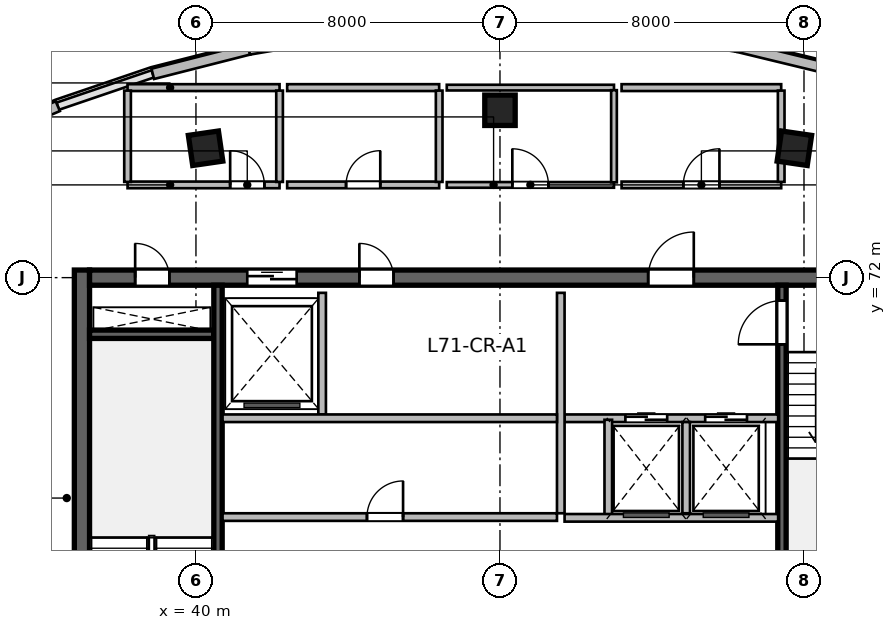
"""IFC4 building model, lengths in metres.
Left out: names, types, materials, properties, quantities, classifications, styles, units other than length and angle.
Written with IfcOpenShell. Run it as: python <this file> out.ifc"""

import sys

from ifc_helpers import new_model, si_unit, direction, frame, frame_2d, origin, origin_2d, place, context, subcontext, project, spatial, rectangle, extrude, source, transform, mapped, element, fill, save


model = new_model("IFC4")
c1 = context("Model", 3, precision=1e-05, world=origin(), true_north=direction((0.0, 1.0)))
c2 = subcontext(c1, "Body", "Model", "MODEL_VIEW")
j1 = project(units=[si_unit("LENGTHUNIT", "METRE"), si_unit("PLANEANGLEUNIT", "RADIAN")], contexts=[c1])
p1 = place(None, origin())
s1 = spatial("IfcSite", under=j1, at=p1, CompositionType="ELEMENT")
p2 = place(p1, origin())
s2 = spatial("IfcBuilding", under=s1, at=p2, CompositionType="ELEMENT")
p3 = place(p2, frame((0.0, 0.0, 291.3)))
s3 = spatial("IfcBuildingStorey", under=s2, at=p3, CompositionType="ELEMENT", Elevation=291.3)
m1 = source(origin(), c2, "Body", "SweptSolid", [
    extrude(rectangle(XDim=12.0, YDim=0.4, at=frame_2d((6.0, 0.0))), origin(), (0.0, 0.0, 1.0), 3.9),
])
p4 = place(p3, frame((37.0, 60.2, 0.0), z_axis=(0.0, 0.0, 1.0), x_axis=(0.0, 1.0, 0.0)))
e1 = element("IfcWall", 1, at=p4, inside=s3, PredefinedType="SHEAR", context=c2, shape_type="MappedRepresentation", body=[
    mapped(m1, transform((0.0, 0.0, 0.0), scale=1.0)),
])
m2 = source(origin(), c2, "Body", "SweptSolid", [
    extrude(rectangle(XDim=21.6, YDim=0.4, at=frame_2d((10.8, 0.0))), origin(), (0.0, 0.0, 1.0), 3.9),
])
p5 = place(p3, frame((37.2, 72.0, 0.0), z_axis=(0.0, 0.0, 1.0), x_axis=(1.0, 0.0, 0.0)))
e2 = element("IfcWall", 2, at=p5, inside=s3, PredefinedType="SHEAR", context=c2, shape_type="MappedRepresentation", body=[
    mapped(m2, transform((0.0, 0.0, 0.0), scale=1.0)),
])
p6 = place(p5, frame((1.2, 0.0, 0.0)))
e3 = element("IfcOpeningElement", 3, at=p6, cuts=e2, PredefinedType="OPENING", context=c2, shape_type="SweptSolid", body=[
    extrude(rectangle(XDim=0.9, YDim=2.1, at=frame_2d((0.45, 1.05))), frame((0.0, 0.21, 0.0), z_axis=(0.0, -1.0, 0.0), x_axis=(1.0, 0.0, 0.0)), (0.0, 0.0, 1.0), 0.42),
])
p7 = place(p5, frame((14.7, 0.0, 0.0)))
e4 = element("IfcOpeningElement", 4, at=p7, cuts=e2, PredefinedType="OPENING", context=c2, shape_type="SweptSolid", body=[
    extrude(rectangle(XDim=1.2, YDim=2.15, at=frame_2d((0.6, 1.075))), frame((0.0, 0.21, 0.0), z_axis=(0.0, -1.0, 0.0), x_axis=(1.0, 0.0, 0.0)), (0.0, 0.0, 1.0), 0.42),
])
p8 = place(p5, frame((4.15, 0.0, 0.0)))
e5 = element("IfcOpeningElement", 5, at=p8, cuts=e2, PredefinedType="OPENING", context=c2, shape_type="SweptSolid", body=[
    extrude(rectangle(XDim=1.3, YDim=2.15, at=frame_2d((0.65, 1.075))), frame((0.0, 0.21, 0.0), z_axis=(0.0, -1.0, 0.0), x_axis=(1.0, 0.0, 0.0)), (0.0, 0.0, 1.0), 0.42),
])
p9 = place(p5, frame((7.1, 0.0, 0.0)))
e6 = element("IfcOpeningElement", 6, at=p9, cuts=e2, PredefinedType="OPENING", context=c2, shape_type="SweptSolid", body=[
    extrude(rectangle(XDim=0.9, YDim=2.1, at=frame_2d((0.45, 1.05))), frame((0.0, 0.21, 0.0), z_axis=(0.0, -1.0, 0.0), x_axis=(1.0, 0.0, 0.0)), (0.0, 0.0, 1.0), 0.42),
])
m3 = source(origin(), c2, "Body", "SweptSolid", [
    extrude(rectangle(XDim=3.27, YDim=0.22, at=frame_2d((1.635, 0.0))), origin(), (0.0, 0.0, 1.0), 3.9),
])
p10 = place(p3, frame((37.2, 70.51, 0.0), z_axis=(0.0, 0.0, 1.0), x_axis=(1.0, 0.0, 0.0)))
e7 = element("IfcWall", 7, at=p10, inside=s3, PredefinedType="SHEAR", context=c2, shape_type="MappedRepresentation", body=[
    mapped(m3, transform((0.0, 0.0, 0.0), scale=1.0)),
])
m4 = source(origin(), c2, "Body", "SweptSolid", [
    extrude(rectangle(XDim=11.2, YDim=0.22, at=frame_2d((5.6, 0.0))), origin(), (0.0, 0.0, 1.0), 3.9),
])
p11 = place(p3, frame((40.58, 60.6, 0.0), z_axis=(0.0, 0.0, 1.0), x_axis=(0.0, 1.0, 0.0)))
e8 = element("IfcWall", 8, at=p11, inside=s3, PredefinedType="SHEAR", context=c2, shape_type="MappedRepresentation", body=[
    mapped(m4, transform((0.0, 0.0, 0.0), scale=1.0)),
])
p12 = place(p3, frame((55.42, 60.6, 0.0), z_axis=(0.0, 0.0, 1.0), x_axis=(0.0, 1.0, 0.0)))
e9 = element("IfcWall", 9, at=p12, inside=s3, PredefinedType="SHEAR", context=c2, shape_type="MappedRepresentation", body=[
    mapped(m4, transform((0.0, 0.0, 0.0), scale=1.0)),
])
p13 = place(p12, frame((9.645, 0.0, 0.0)))
e10 = element("IfcOpeningElement", 10, at=p13, cuts=e9, PredefinedType="OPENING", context=c2, shape_type="SweptSolid", body=[
    extrude(rectangle(XDim=1.15, YDim=2.15, at=frame_2d((0.575, 1.075))), frame((0.0, 0.12, 0.0), z_axis=(0.0, -1.0, 0.0), x_axis=(1.0, 0.0, 0.0)), (0.0, 0.0, 1.0), 0.24),
])
m5 = source(origin(), c2, "Body", "SweptSolid", [
    extrude(rectangle(XDim=0.8, YDim=0.8, at=origin_2d()), origin(), (0.0, 0.0, 1.0), 3.9),
])
for number, where, z_axis, x_axis in (
    (11, (40.253, 75.404, 0.0), (0.0, 0.0, 1.0), (-0.143, 0.99, 0.0)),
    (12, (48.0, 76.404, 0.0), (0.0, 0.0, 1.0), (0.0, 1.0, 0.0)),
    (13, (55.747, 75.404, 0.0), (0.0, 0.0, 1.0), (0.143, 0.99, 0.0)),
):
    element("IfcColumn", number, at=place(p3, frame(where, z_axis=z_axis, x_axis=x_axis)), inside=s3, PredefinedType="COLUMN", context=c2, shape_type="MappedRepresentation", body=[
        mapped(m5, transform((0.0, 0.0, 0.0), scale=1.0)),
    ])
m6 = source(origin(), c2, "Body", "SweptSolid", [
    extrude(rectangle(XDim=2.673, YDim=0.28, at=frame_2d((1.337, 0.0))), origin(), (0.0, 0.0, 1.0), 3.64),
])
p14 = place(p3, frame((33.907, 75.458, 0.0), z_axis=(0.0, 0.0, 1.0), x_axis=(0.919036345912, 0.394172798266, 0.0)))
e14 = element("IfcWall", 14, at=p14, inside=s3, PredefinedType="SOLIDWALL", context=c2, shape_type="MappedRepresentation", body=[
    mapped(m6, transform((0.0, 0.0, 0.0), scale=1.0)),
])
m7 = source(origin(), c2, "Body", "SweptSolid", [
    extrude(rectangle(XDim=2.614, YDim=0.28, at=frame_2d((1.307, 0.0))), origin(), (0.0, 0.0, 1.0), 3.64),
])
p15 = place(p3, frame((38.863, 77.362, 0.0), z_axis=(0.0, 0.0, 1.0), x_axis=(0.969106509315, 0.246642602978, 0.0)))
e15 = element("IfcWall", 15, at=p15, inside=s3, PredefinedType="SOLIDWALL", context=c2, shape_type="MappedRepresentation", body=[
    mapped(m7, transform((0.0, 0.0, 0.0), scale=1.0)),
])
m8 = source(origin(), c2, "Body", "SweptSolid", [
    extrude(rectangle(XDim=2.594, YDim=0.28, at=frame_2d((1.297, 0.0))), origin(), (0.0, 0.0, 1.0), 3.64),
])
p16 = place(p3, frame((41.397, 78.007, 0.0), z_axis=(0.0, 0.0, 1.0), x_axis=(0.985792341502, 0.167968626344, 0.0)))
e16 = element("IfcWall", 16, at=p16, inside=s3, PredefinedType="SOLIDWALL", context=c2, shape_type="MappedRepresentation", body=[
    mapped(m8, transform((0.0, 0.0, 0.0), scale=1.0)),
])
m9 = source(origin(), c2, "Body", "SweptSolid", [
    extrude(rectangle(XDim=2.611, YDim=0.28, at=frame_2d((1.305, 0.0))), origin(), (0.0, 0.0, 1.0), 3.64),
])
p17 = place(p3, frame((54.239, 78.082, 0.0), z_axis=(0.0, 0.0, 1.0), x_axis=(0.97188253817, -0.235466201396, 0.0)))
e17 = element("IfcWall", 17, at=p17, inside=s3, PredefinedType="SOLIDWALL", context=c2, shape_type="MappedRepresentation", body=[
    mapped(m9, transform((0.0, 0.0, 0.0), scale=1.0)),
])
m10 = source(origin(), c2, "Body", "SweptSolid", [
    extrude(rectangle(XDim=5.62, YDim=0.2, at=frame_2d((2.81, 0.0))), origin(), (0.0, 0.0, 1.0), 3.64),
])
p18 = place(p3, frame((49.7, 68.3, 0.0), z_axis=(0.0, 0.0, 1.0), x_axis=(1.0, 0.0, 0.0)))
e18 = element("IfcWall", 18, at=p18, inside=s3, PredefinedType="SOLIDWALL", context=c2, shape_type="MappedRepresentation", body=[
    mapped(m10, transform((0.0, 0.0, 0.0), scale=1.0)),
])
p19 = place(p18, frame((1.6, 0.0, 0.0)))
e19 = element("IfcOpeningElement", 19, at=p19, cuts=e18, PredefinedType="OPENING", context=c2, shape_type="SweptSolid", body=[
    extrude(rectangle(XDim=1.1, YDim=2.15, at=frame_2d((0.55, 1.075))), frame((0.0, 0.11, 0.0), z_axis=(0.0, -1.0, 0.0), x_axis=(1.0, 0.0, 0.0)), (0.0, 0.0, 1.0), 0.22),
])
p20 = place(p18, frame((3.7, 0.0, 0.0)))
e20 = element("IfcOpeningElement", 20, at=p20, cuts=e18, PredefinedType="OPENING", context=c2, shape_type="SweptSolid", body=[
    extrude(rectangle(XDim=1.1, YDim=2.15, at=frame_2d((0.55, 1.075))), frame((0.0, 0.11, 0.0), z_axis=(0.0, -1.0, 0.0), x_axis=(1.0, 0.0, 0.0)), (0.0, 0.0, 1.0), 0.22),
])
m11 = source(origin(), c2, "Body", "SweptSolid", [
    extrude(rectangle(XDim=5.8, YDim=0.2, at=frame_2d((2.9, 0.0))), origin(), (0.0, 0.0, 1.0), 3.64),
])
p21 = place(p3, frame((49.6, 65.8, 0.0), z_axis=(0.0, 0.0, 1.0), x_axis=(0.0, 1.0, 0.0)))
e21 = element("IfcWall", 21, at=p21, inside=s3, PredefinedType="SOLIDWALL", context=c2, shape_type="MappedRepresentation", body=[
    mapped(m11, transform((0.0, 0.0, 0.0), scale=1.0)),
])
m12 = source(origin(), c2, "Body", "SweptSolid", [
    extrude(rectangle(XDim=2.58, YDim=0.2, at=frame_2d((1.29, 0.0))), origin(), (0.0, 0.0, 1.0), 3.64),
])
p22 = place(p3, frame((50.85, 65.68, 0.0), z_axis=(0.0, 0.0, 1.0), x_axis=(0.0, 1.0, 0.0)))
e22 = element("IfcWall", 22, at=p22, inside=s3, PredefinedType="SOLIDWALL", context=c2, shape_type="MappedRepresentation", body=[
    mapped(m12, transform((0.0, 0.0, 0.0), scale=1.0)),
])
m13 = source(origin(), c2, "Body", "SweptSolid", [
    extrude(rectangle(XDim=2.4, YDim=0.2, at=frame_2d((1.2, 0.0))), origin(), (0.0, 0.0, 1.0), 3.64),
])
p23 = place(p3, frame((52.9, 65.8, 0.0), z_axis=(0.0, 0.0, 1.0), x_axis=(0.0, 1.0, 0.0)))
e23 = element("IfcWall", 23, at=p23, inside=s3, PredefinedType="SOLIDWALL", context=c2, shape_type="MappedRepresentation", body=[
    mapped(m13, transform((0.0, 0.0, 0.0), scale=1.0)),
])
p24 = place(p3, frame((49.7, 65.68, 0.0), z_axis=(0.0, 0.0, 1.0), x_axis=(1.0, 0.0, 0.0)))
e24 = element("IfcWall", 24, at=p24, inside=s3, PredefinedType="SOLIDWALL", context=c2, shape_type="MappedRepresentation", body=[
    mapped(m10, transform((0.0, 0.0, 0.0), scale=1.0)),
])
m14 = source(origin(), c2, "Body", "SweptSolid", [
    extrude(rectangle(XDim=3.2, YDim=0.2, at=frame_2d((1.6, 0.0))), origin(), (0.0, 0.0, 1.0), 3.64),
])
p25 = place(p3, frame((43.32, 68.4, 0.0), z_axis=(0.0, 0.0, 1.0), x_axis=(0.0, 1.0, 0.0)))
e25 = element("IfcWall", 25, at=p25, inside=s3, PredefinedType="SOLIDWALL", context=c2, shape_type="MappedRepresentation", body=[
    mapped(m14, transform((0.0, 0.0, 0.0), scale=1.0)),
])
m15 = source(origin(), c2, "Body", "SweptSolid", [
    extrude(rectangle(XDim=8.8, YDim=0.2, at=frame_2d((4.4, 0.0))), origin(), (0.0, 0.0, 1.0), 3.64),
])
p26 = place(p3, frame((40.7, 68.3, 0.0), z_axis=(0.0, 0.0, 1.0), x_axis=(1.0, 0.0, 0.0)))
e26 = element("IfcWall", 26, at=p26, inside=s3, PredefinedType="SOLIDWALL", context=c2, shape_type="MappedRepresentation", body=[
    mapped(m15, transform((0.0, 0.0, 0.0), scale=1.0)),
])
p27 = place(p3, frame((40.7, 65.7, 0.0), z_axis=(0.0, 0.0, 1.0), x_axis=(1.0, 0.0, 0.0)))
e27 = element("IfcWall", 27, at=p27, inside=s3, PredefinedType="SOLIDWALL", context=c2, shape_type="MappedRepresentation", body=[
    mapped(m15, transform((0.0, 0.0, 0.0), scale=1.0)),
])
p28 = place(p27, frame((3.8, 0.0, 0.0)))
e28 = element("IfcOpeningElement", 28, at=p28, cuts=e27, PredefinedType="OPENING", context=c2, shape_type="SweptSolid", body=[
    extrude(rectangle(XDim=0.95, YDim=2.15, at=frame_2d((0.475, 1.075))), frame((0.0, 0.11, 0.0), z_axis=(0.0, -1.0, 0.0), x_axis=(1.0, 0.0, 0.0)), (0.0, 0.0, 1.0), 0.22),
])
m16 = source(origin(), c2, "Body", "SweptSolid", [
    extrude(rectangle(XDim=4.0, YDim=0.175, at=frame_2d((2.0, 0.0))), origin(), (0.0, 0.0, 1.0), 3.64),
])
p29 = place(p3, frame((38.2, 74.44, 0.0), z_axis=(0.0, 0.0, 1.0), x_axis=(1.0, 0.0, 0.0)))
e29 = element("IfcWall", 29, at=p29, inside=s3, PredefinedType="PARTITIONING", context=c2, shape_type="MappedRepresentation", body=[
    mapped(m16, transform((0.0, 0.0, 0.0), scale=1.0)),
])
p30 = place(p29, frame((2.7, 0.0, 0.0)))
e30 = element("IfcOpeningElement", 30, at=p30, cuts=e29, PredefinedType="OPENING", context=c2, shape_type="SweptSolid", body=[
    extrude(rectangle(XDim=0.9, YDim=2.08, at=frame_2d((0.45, 1.04))), frame((0.0, 0.098, 0.0), z_axis=(0.0, -1.0, 0.0), x_axis=(1.0, 0.0, 0.0)), (0.0, 0.0, 1.0), 0.195),
])
m17 = source(origin(), c2, "Body", "SweptSolid", [
    extrude(rectangle(XDim=4.0, YDim=0.18, at=frame_2d((2.0, 0.0))), origin(), (0.0, 0.0, 1.0), 3.64),
])
p31 = place(p3, frame((38.2, 77.0, 0.0), z_axis=(0.0, 0.0, 1.0), x_axis=(1.0, 0.0, 0.0)))
e31 = element("IfcWall", 31, at=p31, inside=s3, PredefinedType="PLUMBINGWALL", context=c2, shape_type="MappedRepresentation", body=[
    mapped(m17, transform((0.0, 0.0, 0.0), scale=1.0)),
])
m18 = source(origin(), c2, "Body", "SweptSolid", [
    extrude(rectangle(XDim=2.403, YDim=0.175, at=frame_2d((1.201, 0.0))), origin(), (0.0, 0.0, 1.0), 3.64),
])
for number, where, z_axis, x_axis in (
    (32, (38.2, 74.519, 0.0), (0.0, 0.0, 1.0), (0.0, 1.0, 0.0)),
    (33, (42.2, 74.519, 0.0), (0.0, 0.0, 1.0), (0.0, 1.0, 0.0)),
):
    element("IfcWall", number, at=place(p3, frame(where, z_axis=z_axis, x_axis=x_axis)), inside=s3, PredefinedType="PARTITIONING", context=c2, shape_type="MappedRepresentation", body=[
        mapped(m18, transform((0.0, 0.0, 0.0), scale=1.0)),
    ])
p32 = place(p3, frame((42.4, 74.44, 0.0), z_axis=(0.0, 0.0, 1.0), x_axis=(1.0, 0.0, 0.0)))
e34 = element("IfcWall", 34, at=p32, inside=s3, PredefinedType="PARTITIONING", context=c2, shape_type="MappedRepresentation", body=[
    mapped(m16, transform((0.0, 0.0, 0.0), scale=1.0)),
])
p33 = place(p32, frame((1.55, 0.0, 0.0)))
e35 = element("IfcOpeningElement", 35, at=p33, cuts=e34, PredefinedType="OPENING", context=c2, shape_type="SweptSolid", body=[
    extrude(rectangle(XDim=0.9, YDim=2.08, at=frame_2d((0.45, 1.04))), frame((0.0, 0.098, 0.0), z_axis=(0.0, -1.0, 0.0), x_axis=(1.0, 0.0, 0.0)), (0.0, 0.0, 1.0), 0.195),
])
p34 = place(p3, frame((42.4, 77.0, 0.0), z_axis=(0.0, 0.0, 1.0), x_axis=(1.0, 0.0, 0.0)))
e36 = element("IfcWall", 36, at=p34, inside=s3, PredefinedType="PLUMBINGWALL", context=c2, shape_type="MappedRepresentation", body=[
    mapped(m17, transform((0.0, 0.0, 0.0), scale=1.0)),
])
p35 = place(p3, frame((46.4, 74.519, 0.0), z_axis=(0.0, 0.0, 1.0), x_axis=(0.0, 1.0, 0.0)))
e37 = element("IfcWall", 37, at=p35, inside=s3, PredefinedType="PARTITIONING", context=c2, shape_type="MappedRepresentation", body=[
    mapped(m18, transform((0.0, 0.0, 0.0), scale=1.0)),
])
m19 = source(origin(), c2, "Body", "SweptSolid", [
    extrude(rectangle(XDim=4.4, YDim=0.15, at=frame_2d((2.2, 0.0))), origin(), (0.0, 0.0, 1.0), 3.64),
])
p36 = place(p3, frame((46.6, 74.44, 0.0), z_axis=(0.0, 0.0, 1.0), x_axis=(1.0, 0.0, 0.0)))
e38 = element("IfcWall", 38, at=p36, inside=s3, PredefinedType="PARTITIONING", context=c2, shape_type="MappedRepresentation", body=[
    mapped(m19, transform((0.0, 0.0, 0.0), scale=1.0)),
])
p37 = place(p36, frame((1.725, 0.0, 0.0)))
e39 = element("IfcOpeningElement", 39, at=p37, cuts=e38, PredefinedType="OPENING", context=c2, shape_type="SweptSolid", body=[
    extrude(rectangle(XDim=0.95, YDim=2.1, at=frame_2d((0.475, 1.05))), frame((0.0, 0.085, 0.0), z_axis=(0.0, -1.0, 0.0), x_axis=(1.0, 0.0, 0.0)), (0.0, 0.0, 1.0), 0.17),
])
p38 = place(p3, frame((46.6, 77.0, 0.0), z_axis=(0.0, 0.0, 1.0), x_axis=(1.0, 0.0, 0.0)))
e40 = element("IfcWall", 40, at=p38, inside=s3, PredefinedType="PARTITIONING", context=c2, shape_type="MappedRepresentation", body=[
    mapped(m19, transform((0.0, 0.0, 0.0), scale=1.0)),
])
m20 = source(origin(), c2, "Body", "SweptSolid", [
    extrude(rectangle(XDim=2.425, YDim=0.15, at=frame_2d((1.212, 0.0))), origin(), (0.0, 0.0, 1.0), 3.64),
])
p39 = place(p3, frame((51.0, 74.508, 0.0), z_axis=(0.0, 0.0, 1.0), x_axis=(0.0, 1.0, 0.0)))
e41 = element("IfcWall", 41, at=p39, inside=s3, PredefinedType="PARTITIONING", context=c2, shape_type="MappedRepresentation", body=[
    mapped(m20, transform((0.0, 0.0, 0.0), scale=1.0)),
])
m21 = source(origin(), c2, "Body", "SweptSolid", [
    extrude(rectangle(XDim=4.2, YDim=0.175, at=frame_2d((2.1, 0.0))), origin(), (0.0, 0.0, 1.0), 3.64),
])
p40 = place(p3, frame((51.2, 74.44, 0.0), z_axis=(0.0, 0.0, 1.0), x_axis=(1.0, 0.0, 0.0)))
e42 = element("IfcWall", 42, at=p40, inside=s3, PredefinedType="PARTITIONING", context=c2, shape_type="MappedRepresentation", body=[
    mapped(m21, transform((0.0, 0.0, 0.0), scale=1.0)),
])
p41 = place(p40, frame((1.625, 0.0, 0.0)))
e43 = element("IfcOpeningElement", 43, at=p41, cuts=e42, PredefinedType="OPENING", context=c2, shape_type="SweptSolid", body=[
    extrude(rectangle(XDim=0.95, YDim=2.12, at=frame_2d((0.475, 1.06))), frame((0.0, 0.098, 0.0), z_axis=(0.0, -1.0, 0.0), x_axis=(1.0, 0.0, 0.0)), (0.0, 0.0, 1.0), 0.195),
])
m22 = source(origin(), c2, "Body", "SweptSolid", [
    extrude(rectangle(XDim=4.2, YDim=0.18, at=frame_2d((2.1, 0.0))), origin(), (0.0, 0.0, 1.0), 3.64),
])
p42 = place(p3, frame((51.2, 77.0, 0.0), z_axis=(0.0, 0.0, 1.0), x_axis=(1.0, 0.0, 0.0)))
e44 = element("IfcWall", 44, at=p42, inside=s3, PredefinedType="PLUMBINGWALL", context=c2, shape_type="MappedRepresentation", body=[
    mapped(m22, transform((0.0, 0.0, 0.0), scale=1.0)),
])
p43 = place(p3, frame((55.4, 74.519, 0.0), z_axis=(0.0, 0.0, 1.0), x_axis=(0.0, 1.0, 0.0)))
e45 = element("IfcWall", 45, at=p43, inside=s3, PredefinedType="PARTITIONING", context=c2, shape_type="MappedRepresentation", body=[
    mapped(m18, transform((0.0, 0.0, 0.0), scale=1.0)),
])
m23 = source(origin(), c2, "Body", "SweptSolid", [
    extrude(rectangle(XDim=0.9, YDim=2.1, at=frame_2d((0.45, 1.05))), frame((0.0, 0.025, 0.0), z_axis=(0.0, -1.0, 0.0), x_axis=(1.0, 0.0, 0.0)), (0.0, 0.0, 1.0), 0.05),
])
p44 = place(p6, origin())
e46 = element("IfcDoor", 46, at=p44, inside=s3, OperationType="SINGLE_SWING_LEFT", PredefinedType="DOOR", context=c2, shape_type="MappedRepresentation", body=[
    mapped(m23, transform((0.0, 0.0, 0.0), scale=1.0)),
])
fill(e3, e46)
m24 = source(origin(), c2, "Body", "SweptSolid", [
    extrude(rectangle(XDim=1.15, YDim=2.15, at=frame_2d((0.575, 1.075))), frame((0.0, 0.025, 0.0), z_axis=(0.0, -1.0, 0.0), x_axis=(1.0, 0.0, 0.0)), (0.0, 0.0, 1.0), 0.05),
])
p45 = place(p13, origin())
e47 = element("IfcDoor", 47, at=p45, inside=s3, OperationType="SINGLE_SWING_LEFT", PredefinedType="DOOR", context=c2, shape_type="MappedRepresentation", body=[
    mapped(m24, transform((0.0, 0.0, 0.0), scale=1.0)),
])
fill(e10, e47)
m25 = source(origin(), c2, "Body", "SweptSolid", [
    extrude(rectangle(XDim=1.2, YDim=2.15, at=frame_2d((0.6, 1.075))), frame((0.0, 0.025, 0.0), z_axis=(0.0, -1.0, 0.0), x_axis=(1.0, 0.0, 0.0)), (0.0, 0.0, 1.0), 0.05),
])
p46 = place(p7, origin())
e48 = element("IfcDoor", 48, at=p46, inside=s3, OperationType="SINGLE_SWING_RIGHT", PredefinedType="DOOR", context=c2, shape_type="MappedRepresentation", body=[
    mapped(m25, transform((0.0, 0.0, 0.0), scale=1.0)),
])
fill(e4, e48)
m26 = source(origin(), c2, "Body", "SweptSolid", [
    extrude(rectangle(XDim=1.1, YDim=2.15, at=frame_2d((0.55, 1.075))), frame((0.0, 0.025, 0.0), z_axis=(0.0, -1.0, 0.0), x_axis=(1.0, 0.0, 0.0)), (0.0, 0.0, 1.0), 0.05),
])
p47 = place(p19, origin())
e49 = element("IfcDoor", 49, at=p47, inside=s3, OperationType="DOUBLE_DOOR_SLIDING", PredefinedType="DOOR", context=c2, shape_type="MappedRepresentation", body=[
    mapped(m26, transform((0.0, 0.0, 0.0), scale=1.0)),
])
fill(e19, e49)
p48 = place(p20, origin())
e50 = element("IfcDoor", 50, at=p48, inside=s3, OperationType="DOUBLE_DOOR_SLIDING", PredefinedType="DOOR", context=c2, shape_type="MappedRepresentation", body=[
    mapped(m26, transform((0.0, 0.0, 0.0), scale=1.0)),
])
fill(e20, e50)
m27 = source(origin(), c2, "Body", "SweptSolid", [
    extrude(rectangle(XDim=1.3, YDim=2.15, at=frame_2d((0.65, 1.075))), frame((0.0, 0.025, 0.0), z_axis=(0.0, -1.0, 0.0), x_axis=(1.0, 0.0, 0.0)), (0.0, 0.0, 1.0), 0.05),
])
p49 = place(p8, origin())
e51 = element("IfcDoor", 51, at=p49, inside=s3, OperationType="DOUBLE_DOOR_SLIDING", PredefinedType="DOOR", context=c2, shape_type="MappedRepresentation", body=[
    mapped(m27, transform((0.0, 0.0, 0.0), scale=1.0)),
])
fill(e5, e51)
p50 = place(p9, origin())
e52 = element("IfcDoor", 52, at=p50, inside=s3, OperationType="SINGLE_SWING_LEFT", PredefinedType="DOOR", context=c2, shape_type="MappedRepresentation", body=[
    mapped(m23, transform((0.0, 0.0, 0.0), scale=1.0)),
])
fill(e6, e52)
m28 = source(origin(), c2, "Body", "SweptSolid", [
    extrude(rectangle(XDim=0.95, YDim=2.15, at=frame_2d((0.475, 1.075))), frame((0.0, 0.025, 0.0), z_axis=(0.0, -1.0, 0.0), x_axis=(1.0, 0.0, 0.0)), (0.0, 0.0, 1.0), 0.05),
])
p51 = place(p28, origin())
e53 = element("IfcDoor", 53, at=p51, inside=s3, OperationType="SINGLE_SWING_RIGHT", PredefinedType="DOOR", context=c2, shape_type="MappedRepresentation", body=[
    mapped(m28, transform((0.0, 0.0, 0.0), scale=1.0)),
])
fill(e28, e53)
m29 = source(origin(), c2, "Body", "SweptSolid", [
    extrude(rectangle(XDim=0.9, YDim=2.08, at=frame_2d((0.45, 1.04))), frame((0.0, 0.025, 0.0), z_axis=(0.0, -1.0, 0.0), x_axis=(1.0, 0.0, 0.0)), (0.0, 0.0, 1.0), 0.05),
])
p52 = place(p30, origin())
e54 = element("IfcDoor", 54, at=p52, inside=s3, OperationType="SINGLE_SWING_LEFT", PredefinedType="DOOR", context=c2, shape_type="MappedRepresentation", body=[
    mapped(m29, transform((0.0, 0.0, 0.0), scale=1.0)),
])
fill(e30, e54)
p53 = place(p33, origin())
e55 = element("IfcDoor", 55, at=p53, inside=s3, OperationType="SINGLE_SWING_RIGHT", PredefinedType="DOOR", context=c2, shape_type="MappedRepresentation", body=[
    mapped(m29, transform((0.0, 0.0, 0.0), scale=1.0)),
])
fill(e35, e55)
m30 = source(origin(), c2, "Body", "SweptSolid", [
    extrude(rectangle(XDim=0.95, YDim=2.1, at=frame_2d((0.475, 1.05))), frame((0.0, 0.025, 0.0), z_axis=(0.0, -1.0, 0.0), x_axis=(1.0, 0.0, 0.0)), (0.0, 0.0, 1.0), 0.05),
])
p54 = place(p37, origin())
e56 = element("IfcDoor", 56, at=p54, inside=s3, OperationType="SINGLE_SWING_LEFT", PredefinedType="DOOR", context=c2, shape_type="MappedRepresentation", body=[
    mapped(m30, transform((0.0, 0.0, 0.0), scale=1.0)),
])
fill(e39, e56)
m31 = source(origin(), c2, "Body", "SweptSolid", [
    extrude(rectangle(XDim=0.95, YDim=2.12, at=frame_2d((0.475, 1.06))), frame((0.0, 0.025, 0.0), z_axis=(0.0, -1.0, 0.0), x_axis=(1.0, 0.0, 0.0)), (0.0, 0.0, 1.0), 0.05),
])
p55 = place(p41, origin())
e57 = element("IfcDoor", 57, at=p55, inside=s3, OperationType="SINGLE_SWING_RIGHT", PredefinedType="DOOR", context=c2, shape_type="MappedRepresentation", body=[
    mapped(m31, transform((0.0, 0.0, 0.0), scale=1.0)),
])
fill(e43, e57)
save(model, sys.argv[1])
